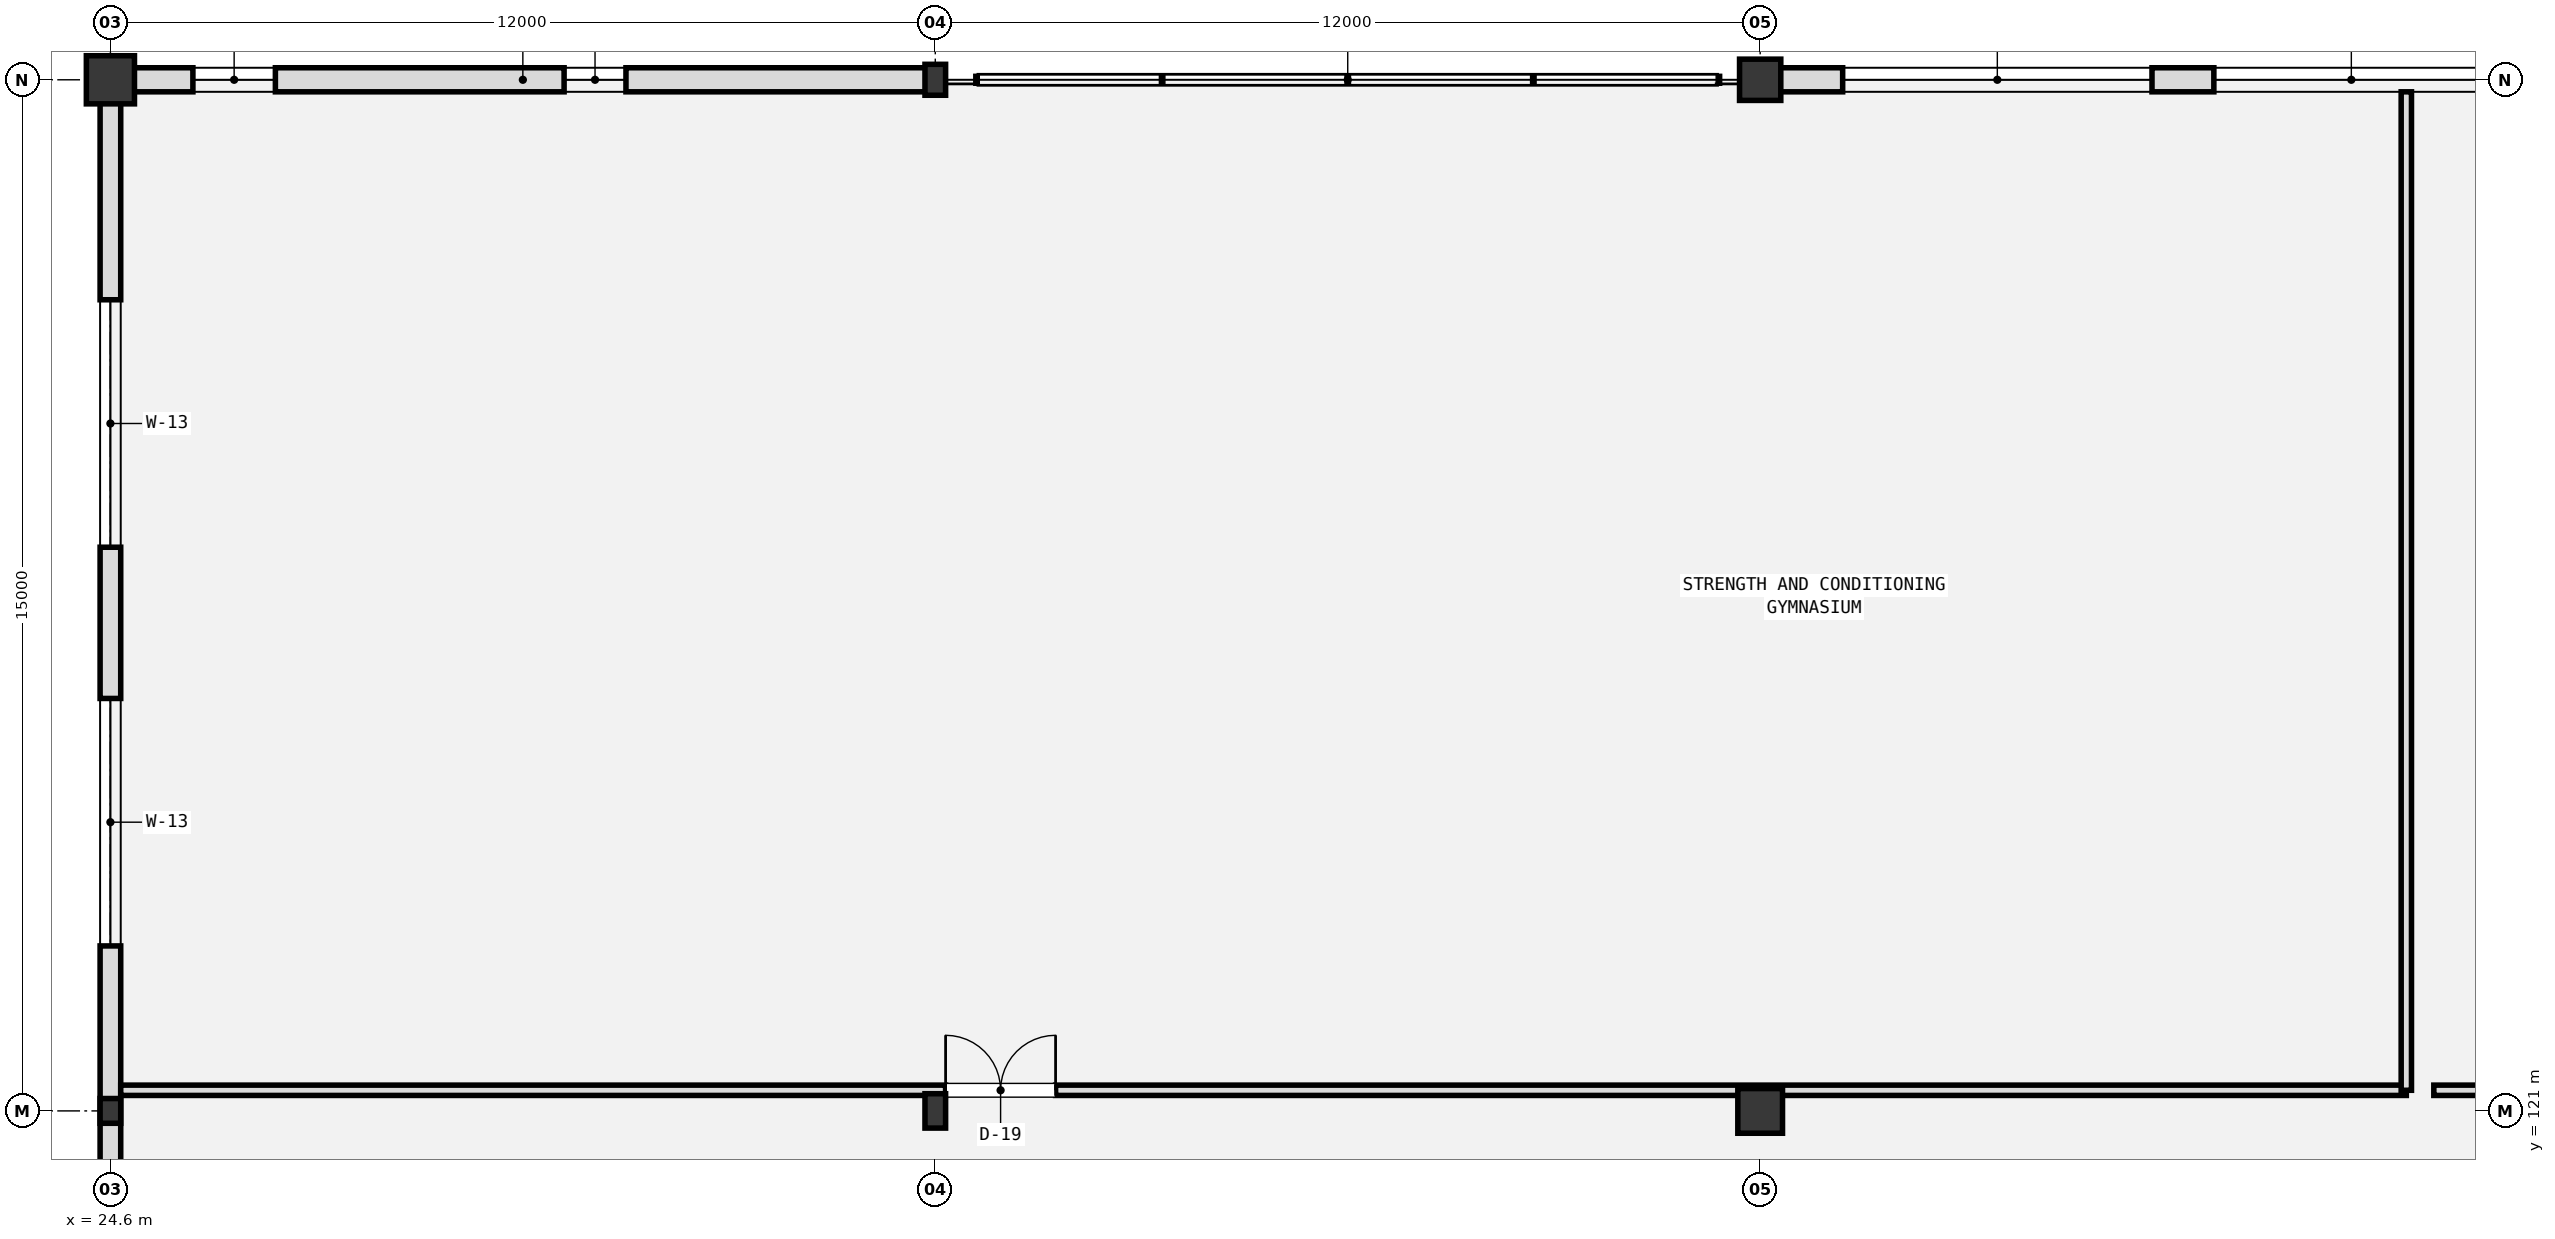
"""IFC4 building model, lengths in metres.
Left out: names, types, materials, properties, quantities, classifications, styles, units other than length and angle.
Written with IfcOpenShell. Run it as: python <this file> out.ifc"""

import sys

from ifc_helpers import new_model, si_unit, direction, frame, frame_2d, origin, origin_2d, place, context, subcontext, project, spatial, rectangle, i_section, extrude, element, fill, save


model = new_model("IFC4")
c1 = context("Model", 3, precision=1e-05, world=origin(), true_north=direction((0.0, 1.0)))
c2 = subcontext(c1, "Body", "Model", "MODEL_VIEW")
j1 = project(units=[si_unit("LENGTHUNIT", "METRE"), si_unit("PLANEANGLEUNIT", "RADIAN")], contexts=[c1])
p1 = place(None, origin())
s1 = spatial("IfcSite", under=j1, at=p1, CompositionType="ELEMENT")
p2 = place(p1, origin())
s2 = spatial("IfcBuilding", under=s1, at=p2, CompositionType="ELEMENT")
p3 = place(p2, frame((0.0, 0.0, 5.4)))
s3 = spatial("IfcBuildingStorey", under=s2, at=p3, CompositionType="ELEMENT", Elevation=5.4)
p4 = place(p3, frame((24.6, 121.0, 0.0), z_axis=(0.0, 0.0, 1.0), x_axis=(1.0, 0.0, 0.0)))
e1 = element("IfcColumn", 1, at=p4, inside=s3, PredefinedType="PILASTER", context=c2, shape_type="SweptSolid", body=[
    extrude(i_section(OverallWidth=0.3, OverallDepth=0.36, WebThickness=0.012, FlangeThickness=0.022, FilletRadius=0.027, at=origin_2d()), origin(), (0.0, 0.0, 1.0), 4.2),
])
p5 = place(p3, frame((24.6, 136.0, 0.0), z_axis=(0.0, 0.0, 1.0), x_axis=(1.0, 0.0, 0.0)))
e2 = element("IfcColumn", 2, at=p5, inside=s3, PredefinedType="COLUMN", context=c2, shape_type="SweptSolid", body=[
    extrude(rectangle(XDim=0.7, YDim=0.7, at=origin_2d()), origin(), (0.0, 0.0, 1.0), 4.2),
])
p6 = place(p3, frame((36.6, 121.0, 0.0), z_axis=(0.0, 0.0, 1.0), x_axis=(1.0, 0.0, 0.0)))
e3 = element("IfcColumn", 3, at=p6, inside=s3, PredefinedType="COLUMN", context=c2, shape_type="SweptSolid", body=[
    extrude(i_section(OverallWidth=0.3, OverallDepth=0.5, WebThickness=0.014, FlangeThickness=0.028, FilletRadius=0.027, at=origin_2d()), origin(), (0.0, 0.0, 1.0), 4.2),
])
p7 = place(p3, frame((36.6, 136.0, 0.0), z_axis=(0.0, 0.0, 1.0), x_axis=(1.0, 0.0, 0.0)))
e4 = element("IfcColumn", 4, at=p7, inside=s3, PredefinedType="COLUMN", context=c2, shape_type="SweptSolid", body=[
    extrude(i_section(OverallWidth=0.3, OverallDepth=0.45, WebThickness=0.014, FlangeThickness=0.026, FilletRadius=0.027, at=origin_2d()), origin(), (0.0, 0.0, 1.0), 4.2),
])
p8 = place(p3, frame((48.6, 121.0, 0.0), z_axis=(0.0, 0.0, 1.0), x_axis=(1.0, 0.0, 0.0)))
e5 = element("IfcColumn", 5, at=p8, inside=s3, PredefinedType="COLUMN", context=c2, shape_type="SweptSolid", body=[
    extrude(rectangle(XDim=0.65, YDim=0.65, at=origin_2d()), origin(), (0.0, 0.0, 1.0), 4.2),
])
p9 = place(p3, frame((48.6, 136.0, 0.0), z_axis=(0.0, 0.0, 1.0), x_axis=(1.0, 0.0, 0.0)))
e6 = element("IfcColumn", 6, at=p9, inside=s3, PredefinedType="COLUMN", context=c2, shape_type="SweptSolid", body=[
    extrude(rectangle(XDim=0.6, YDim=0.6, at=origin_2d()), origin(), (0.0, 0.0, 1.0), 4.2),
])
p10 = place(p3, frame((24.6, 136.0, 0.0), z_axis=(0.0, 0.0, 1.0), x_axis=(1.0, 0.0, 0.0)))
e7 = element("IfcWall", 7, at=p10, inside=s3, PredefinedType="SOLIDWALL", context=c2, shape_type="SweptSolid", body=[
    extrude(rectangle(XDim=12.0, YDim=0.35, at=frame_2d((6.0, 0.0))), origin(), (0.0, 0.0, 1.0), 3.64),
])
p11 = place(p10, frame((1.2, 0.0, 0.95)))
e8 = element("IfcOpeningElement", 8, at=p11, cuts=e7, PredefinedType="OPENING", context=c2, shape_type="SweptSolid", body=[
    extrude(rectangle(XDim=1.2, YDim=1.2, at=frame_2d((0.6, 0.6))), frame((0.0, 0.185, 0.0), z_axis=(0.0, -1.0, 0.0), x_axis=(1.0, 0.0, 0.0)), (0.0, 0.0, 1.0), 0.37),
])
p12 = place(p10, frame((6.6, 0.0, 0.95)))
e9 = element("IfcOpeningElement", 9, at=p12, cuts=e7, PredefinedType="OPENING", context=c2, shape_type="SweptSolid", body=[
    extrude(rectangle(XDim=0.9, YDim=0.9, at=frame_2d((0.45, 0.45))), frame((0.0, 0.185, 0.0), z_axis=(0.0, -1.0, 0.0), x_axis=(1.0, 0.0, 0.0)), (0.0, 0.0, 1.0), 0.37),
])
p13 = place(p3, frame((48.6, 136.0, 0.0), z_axis=(0.0, 0.0, 1.0), x_axis=(1.0, 0.0, 0.0)))
e10 = element("IfcWall", 10, at=p13, inside=s3, PredefinedType="SOLIDWALL", context=c2, shape_type="SweptSolid", body=[
    extrude(rectangle(XDim=12.0, YDim=0.35, at=frame_2d((6.0, 0.0))), origin(), (0.0, 0.0, 1.0), 3.43),
])
p14 = place(p13, frame((1.2, 0.0, 0.95)))
e11 = element("IfcOpeningElement", 11, at=p14, cuts=e10, PredefinedType="OPENING", context=c2, shape_type="SweptSolid", body=[
    extrude(rectangle(XDim=4.5, YDim=1.5, at=frame_2d((2.25, 0.75))), frame((0.0, 0.185, 0.0), z_axis=(0.0, -1.0, 0.0), x_axis=(1.0, 0.0, 0.0)), (0.0, 0.0, 1.0), 0.37),
])
p15 = place(p13, frame((6.6, 0.0, 0.95)))
e12 = element("IfcOpeningElement", 12, at=p15, cuts=e10, PredefinedType="OPENING", context=c2, shape_type="SweptSolid", body=[
    extrude(rectangle(XDim=4.0, YDim=1.5, at=frame_2d((2.0, 0.75))), frame((0.0, 0.185, 0.0), z_axis=(0.0, -1.0, 0.0), x_axis=(1.0, 0.0, 0.0)), (0.0, 0.0, 1.0), 0.37),
])
p16 = place(p3, frame((24.6, 108.6, 0.0), z_axis=(0.0, 0.0, 1.0), x_axis=(0.0, 1.0, 0.0)))
e13 = element("IfcWall", 13, at=p16, inside=s3, PredefinedType="SOLIDWALL", context=c2, shape_type="SweptSolid", body=[
    extrude(rectangle(XDim=27.4, YDim=0.3, at=frame_2d((13.7, 0.0))), origin(), (0.0, 0.0, 1.0), 3.08),
])
p17 = place(p16, frame((3.1, 0.0, 0.85)))
e14 = element("IfcOpeningElement", 14, at=p17, cuts=e13, PredefinedType="OPENING", context=c2, shape_type="SweptSolid", body=[
    extrude(rectangle(XDim=3.2, YDim=1.5, at=frame_2d((1.6, 0.75))), frame((0.0, 0.16, 0.0), z_axis=(0.0, -1.0, 0.0), x_axis=(1.0, 0.0, 0.0)), (0.0, 0.0, 1.0), 0.32),
])
p18 = place(p16, frame((14.8, 0.0, 0.85)))
e15 = element("IfcOpeningElement", 15, at=p18, cuts=e13, PredefinedType="OPENING", context=c2, shape_type="SweptSolid", body=[
    extrude(rectangle(XDim=3.6, YDim=1.5, at=frame_2d((1.8, 0.75))), frame((0.0, 0.16, 0.0), z_axis=(0.0, -1.0, 0.0), x_axis=(1.0, 0.0, 0.0)), (0.0, 0.0, 1.0), 0.32),
])
p19 = place(p16, frame((20.6, 0.0, 0.85)))
e16 = element("IfcOpeningElement", 16, at=p19, cuts=e13, PredefinedType="OPENING", context=c2, shape_type="SweptSolid", body=[
    extrude(rectangle(XDim=3.6, YDim=1.5, at=frame_2d((1.8, 0.75))), frame((0.0, 0.16, 0.0), z_axis=(0.0, -1.0, 0.0), x_axis=(1.0, 0.0, 0.0)), (0.0, 0.0, 1.0), 0.32),
])
p20 = place(p3, frame((24.75, 121.3, 0.0), z_axis=(0.0, 0.0, 1.0), x_axis=(1.0, 0.0, 0.0)))
e17 = element("IfcWall", 17, at=p20, inside=s3, PredefinedType="PARTITIONING", context=c2, shape_type="SweptSolid", body=[
    extrude(rectangle(XDim=33.25, YDim=0.15, at=frame_2d((16.625, 0.0))), origin(), (0.0, 0.0, 1.0), 2.7),
])
p21 = place(p20, frame((12.0, 0.0, 0.0)))
e18 = element("IfcOpeningElement", 18, at=p21, cuts=e17, PredefinedType="OPENING", context=c2, shape_type="SweptSolid", body=[
    extrude(rectangle(XDim=1.6, YDim=2.2, at=frame_2d((0.8, 1.1))), frame((0.0, 0.085, 0.0), z_axis=(0.0, -1.0, 0.0), x_axis=(1.0, 0.0, 0.0)), (0.0, 0.0, 1.0), 0.17),
])
p22 = place(p3, frame((58.0, 121.3, 0.0), z_axis=(0.0, 0.0, 1.0), x_axis=(0.0, 1.0, 0.0)))
e19 = element("IfcWall", 19, at=p22, inside=s3, PredefinedType="PARTITIONING", context=c2, shape_type="SweptSolid", body=[
    extrude(rectangle(XDim=14.525, YDim=0.15, at=frame_2d((7.262, 0.0))), origin(), (0.0, 0.0, 1.0), 2.7),
])
p23 = place(p3, frame((58.4, 121.3, 0.0), z_axis=(0.0, 0.0, 1.0), x_axis=(1.0, 0.0, 0.0)))
e20 = element("IfcWall", 20, at=p23, inside=s3, PredefinedType="PARTITIONING", context=c2, shape_type="SweptSolid", body=[
    extrude(rectangle(XDim=25.6, YDim=0.15, at=frame_2d((12.8, 0.0))), origin(), (0.0, 0.0, 1.0), 2.7),
])
p24 = place(p23, frame((10.0, 0.0, 0.0)))
e21 = element("IfcOpeningElement", 21, at=p24, cuts=e20, PredefinedType="OPENING", context=c2, shape_type="SweptSolid", body=[
    extrude(rectangle(XDim=1.6, YDim=2.2, at=frame_2d((0.8, 1.1))), frame((0.0, 0.085, 0.0), z_axis=(0.0, -1.0, 0.0), x_axis=(1.0, 0.0, 0.0)), (0.0, 0.0, 1.0), 0.17),
])
p25 = place(p11, origin())
e22 = element("IfcWindow", 22, at=p25, inside=s3, PartitioningType="SINGLE_PANEL", PredefinedType="WINDOW", context=c2, shape_type="SweptSolid", body=[
    extrude(rectangle(XDim=1.2, YDim=1.2, at=frame_2d((0.6, 0.6))), frame((0.0, 0.03, 0.0), z_axis=(0.0, -1.0, 0.0), x_axis=(1.0, 0.0, 0.0)), (0.0, 0.0, 1.0), 0.06),
])
fill(e8, e22)
p26 = place(p12, origin())
e23 = element("IfcWindow", 23, at=p26, inside=s3, PartitioningType="SINGLE_PANEL", PredefinedType="WINDOW", context=c2, shape_type="SweptSolid", body=[
    extrude(rectangle(XDim=0.9, YDim=0.9, at=frame_2d((0.45, 0.45))), frame((0.0, 0.03, 0.0), z_axis=(0.0, -1.0, 0.0), x_axis=(1.0, 0.0, 0.0)), (0.0, 0.0, 1.0), 0.06),
])
fill(e9, e23)
p27 = place(p14, origin())
e24 = element("IfcWindow", 24, at=p27, inside=s3, PartitioningType="TRIPLE_PANEL_HORIZONTAL", PredefinedType="WINDOW", context=c2, shape_type="SweptSolid", body=[
    extrude(rectangle(XDim=4.5, YDim=1.5, at=frame_2d((2.25, 0.75))), frame((0.0, 0.03, 0.0), z_axis=(0.0, -1.0, 0.0), x_axis=(1.0, 0.0, 0.0)), (0.0, 0.0, 1.0), 0.06),
])
fill(e11, e24)
p28 = place(p15, origin())
e25 = element("IfcWindow", 25, at=p28, inside=s3, PartitioningType="TRIPLE_PANEL_HORIZONTAL", PredefinedType="WINDOW", context=c2, shape_type="SweptSolid", body=[
    extrude(rectangle(XDim=4.0, YDim=1.5, at=frame_2d((2.0, 0.75))), frame((0.0, 0.03, 0.0), z_axis=(0.0, -1.0, 0.0), x_axis=(1.0, 0.0, 0.0)), (0.0, 0.0, 1.0), 0.06),
])
fill(e12, e25)
p29 = place(p18, origin())
e26 = element("IfcWindow", 26, at=p29, inside=s3, PartitioningType="TRIPLE_PANEL_HORIZONTAL", PredefinedType="WINDOW", context=c2, shape_type="SweptSolid", body=[
    extrude(rectangle(XDim=3.6, YDim=1.5, at=frame_2d((1.8, 0.75))), frame((0.0, 0.03, 0.0), z_axis=(0.0, -1.0, 0.0), x_axis=(1.0, 0.0, 0.0)), (0.0, 0.0, 1.0), 0.06),
])
fill(e15, e26)
p30 = place(p19, origin())
e27 = element("IfcWindow", 27, at=p30, inside=s3, PartitioningType="TRIPLE_PANEL_HORIZONTAL", PredefinedType="WINDOW", context=c2, shape_type="SweptSolid", body=[
    extrude(rectangle(XDim=3.6, YDim=1.5, at=frame_2d((1.8, 0.75))), frame((0.0, 0.03, 0.0), z_axis=(0.0, -1.0, 0.0), x_axis=(1.0, 0.0, 0.0)), (0.0, 0.0, 1.0), 0.06),
])
fill(e16, e27)
p31 = place(p21, origin())
e28 = element("IfcDoor", 28, at=p31, inside=s3, OperationType="DOUBLE_DOOR_SINGLE_SWING", PredefinedType="DOOR", context=c2, shape_type="SweptSolid", body=[
    extrude(rectangle(XDim=1.6, YDim=2.2, at=frame_2d((0.8, 1.1))), frame((0.0, 0.025, 0.0), z_axis=(0.0, -1.0, 0.0), x_axis=(1.0, 0.0, 0.0)), (0.0, 0.0, 1.0), 0.05),
])
fill(e18, e28)
save(model, sys.argv[1])
